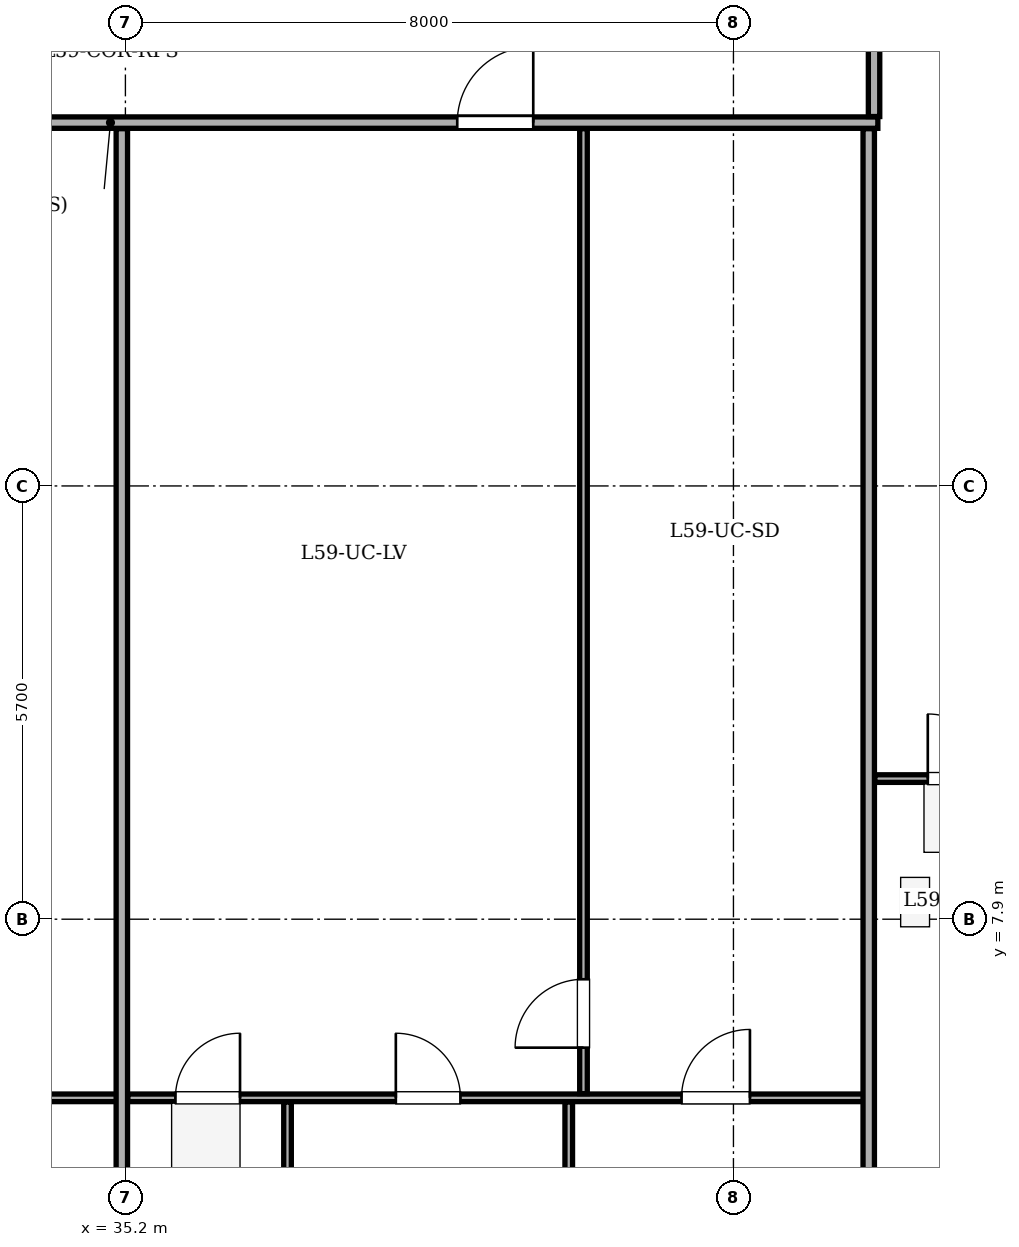
"""IFC4 building model, lengths in metres.
Left out: names, types, materials, properties, quantities, classifications, styles, units other than length and angle.
Written with IfcOpenShell. Run it as: python <this file> out.ifc"""

import sys

from ifc_helpers import new_model, si_unit, direction, frame, frame_2d, origin, place, context, subcontext, project, spatial, rectangle, extrude, element, fill, save


model = new_model("IFC4")
c1 = context("Model", 3, precision=1e-05, world=origin(), true_north=direction((0.0, 1.0)))
c2 = subcontext(c1, "Body", "Model", "MODEL_VIEW")
j1 = project(units=[si_unit("LENGTHUNIT", "METRE"), si_unit("PLANEANGLEUNIT", "RADIAN")], contexts=[c1])
p1 = place(None, origin())
s1 = spatial("IfcSite", under=j1, at=p1, CompositionType="ELEMENT")
p2 = place(p1, origin())
s2 = spatial("IfcBuilding", under=s1, at=p2, CompositionType="ELEMENT")
p3 = place(p2, frame((0.0, 0.0, 227.9)))
s3 = spatial("IfcBuildingStorey", under=s2, at=p3, CompositionType="ELEMENT", Elevation=227.9)
p4 = place(p3, frame((15.08, 18.38, 0.0), z_axis=(0.0, 0.0, 1.0), x_axis=(1.0, 0.0, 0.0)))
e1 = element("IfcWall", 1, at=p4, inside=s3, PredefinedType="PARTITIONING", context=c2, shape_type="SweptSolid", body=[
    extrude(rectangle(XDim=30.02, YDim=0.15, at=frame_2d((15.01, 0.0))), origin(), (0.0, 0.0, 1.0), 3.1),
])
p5 = place(p4, frame((4.385, 0.0, 0.0)))
e2 = element("IfcOpeningElement", 2, at=p5, cuts=e1, PredefinedType="OPENING", context=c2, shape_type="SweptSolid", body=[
    extrude(rectangle(XDim=1.0, YDim=2.1, at=frame_2d((0.5, 1.05))), frame((0.0, 0.085, 0.0), z_axis=(0.0, -1.0, 0.0), x_axis=(1.0, 0.0, 0.0)), (0.0, 0.0, 1.0), 0.17),
])
p6 = place(p4, frame((14.361, 0.0, 0.0)))
e3 = element("IfcOpeningElement", 3, at=p6, cuts=e1, PredefinedType="OPENING", context=c2, shape_type="SweptSolid", body=[
    extrude(rectangle(XDim=1.0, YDim=2.1, at=frame_2d((0.5, 1.05))), frame((0.0, 0.085, 0.0), z_axis=(0.0, -1.0, 0.0), x_axis=(1.0, 0.0, 0.0)), (0.0, 0.0, 1.0), 0.17),
])
p7 = place(p4, frame((24.486, 0.0, 0.0)))
e4 = element("IfcOpeningElement", 4, at=p7, cuts=e1, PredefinedType="OPENING", context=c2, shape_type="SweptSolid", body=[
    extrude(rectangle(XDim=1.0, YDim=2.1, at=frame_2d((0.5, 1.05))), frame((0.0, 0.085, 0.0), z_axis=(0.0, -1.0, 0.0), x_axis=(1.0, 0.0, 0.0)), (0.0, 0.0, 1.0), 0.17),
])
p8 = place(p3, frame((24.81, 5.55, 0.0), z_axis=(0.0, 0.0, 1.0), x_axis=(1.0, 0.0, 0.0)))
e5 = element("IfcWall", 5, at=p8, inside=s3, PredefinedType="PARTITIONING", context=c2, shape_type="SweptSolid", body=[
    extrude(rectangle(XDim=10.383, YDim=0.1, at=frame_2d((5.191, 0.0))), origin(), (0.0, 0.0, 1.0), 3.1),
])
p9 = place(p8, frame((0.625, 0.0, 0.0)))
e6 = element("IfcOpeningElement", 6, at=p9, cuts=e5, PredefinedType="OPENING", context=c2, shape_type="SweptSolid", body=[
    extrude(rectangle(XDim=0.85, YDim=2.05, at=frame_2d((0.425, 1.025))), frame((0.0, 0.06, 0.0), z_axis=(0.0, -1.0, 0.0), x_axis=(1.0, 0.0, 0.0)), (0.0, 0.0, 1.0), 0.12),
])
p10 = place(p8, frame((3.704, 0.0, 0.0)))
e7 = element("IfcOpeningElement", 7, at=p10, cuts=e5, PredefinedType="OPENING", context=c2, shape_type="SweptSolid", body=[
    extrude(rectangle(XDim=0.85, YDim=2.05, at=frame_2d((0.425, 1.025))), frame((0.0, 0.06, 0.0), z_axis=(0.0, -1.0, 0.0), x_axis=(1.0, 0.0, 0.0)), (0.0, 0.0, 1.0), 0.12),
])
p11 = place(p8, frame((7.761, 0.0, 0.0)))
e8 = element("IfcOpeningElement", 8, at=p11, cuts=e5, PredefinedType="OPENING", context=c2, shape_type="SweptSolid", body=[
    extrude(rectangle(XDim=0.9, YDim=2.05, at=frame_2d((0.45, 1.025))), frame((0.0, 0.06, 0.0), z_axis=(0.0, -1.0, 0.0), x_axis=(1.0, 0.0, 0.0)), (0.0, 0.0, 1.0), 0.12),
])
p12 = place(p3, frame((35.153, 3.045, 0.0), z_axis=(0.0, 0.0, 1.0), x_axis=(0.0, 1.0, 0.0)))
e9 = element("IfcWall", 9, at=p12, inside=s3, PredefinedType="PARTITIONING", context=c2, shape_type="SweptSolid", body=[
    extrude(rectangle(XDim=15.255, YDim=0.15, at=frame_2d((7.627, 0.0))), origin(), (0.0, 0.0, 1.0), 2.535),
])
p13 = place(p3, frame((35.233, 5.55, 0.0), z_axis=(0.0, 0.0, 1.0), x_axis=(1.0, 0.0, 0.0)))
e10 = element("IfcWall", 10, at=p13, inside=s3, PredefinedType="PARTITIONING", context=c2, shape_type="SweptSolid", body=[
    extrude(rectangle(XDim=9.787, YDim=0.1, at=frame_2d((4.894, 0.0))), origin(), (0.0, 0.0, 1.0), 3.1),
])
p14 = place(p13, frame((0.625, 0.0, 0.0)))
e11 = element("IfcOpeningElement", 11, at=p14, cuts=e10, PredefinedType="OPENING", context=c2, shape_type="SweptSolid", body=[
    extrude(rectangle(XDim=0.85, YDim=2.05, at=frame_2d((0.425, 1.025))), frame((0.0, 0.06, 0.0), z_axis=(0.0, -1.0, 0.0), x_axis=(1.0, 0.0, 0.0)), (0.0, 0.0, 1.0), 0.12),
])
p15 = place(p13, frame((3.525, 0.0, 0.0)))
e12 = element("IfcOpeningElement", 12, at=p15, cuts=e10, PredefinedType="OPENING", context=c2, shape_type="SweptSolid", body=[
    extrude(rectangle(XDim=0.85, YDim=2.05, at=frame_2d((0.425, 1.025))), frame((0.0, 0.06, 0.0), z_axis=(0.0, -1.0, 0.0), x_axis=(1.0, 0.0, 0.0)), (0.0, 0.0, 1.0), 0.12),
])
p16 = place(p13, frame((7.284, 0.0, 0.0)))
e13 = element("IfcOpeningElement", 13, at=p16, cuts=e10, PredefinedType="OPENING", context=c2, shape_type="SweptSolid", body=[
    extrude(rectangle(XDim=0.9, YDim=2.05, at=frame_2d((0.45, 1.025))), frame((0.0, 0.06, 0.0), z_axis=(0.0, -1.0, 0.0), x_axis=(1.0, 0.0, 0.0)), (0.0, 0.0, 1.0), 0.12),
])
p17 = place(p3, frame((41.227, 5.605, 0.0), z_axis=(0.0, 0.0, 1.0), x_axis=(0.0, 1.0, 0.0)))
e14 = element("IfcWall", 14, at=p17, inside=s3, PredefinedType="PARTITIONING", context=c2, shape_type="SweptSolid", body=[
    extrude(rectangle(XDim=12.695, YDim=0.1, at=frame_2d((6.348, 0.0))), origin(), (0.0, 0.0, 1.0), 3.1),
])
p18 = place(p17, frame((0.605, 0.0, 0.0)))
e15 = element("IfcOpeningElement", 15, at=p18, cuts=e14, PredefinedType="OPENING", context=c2, shape_type="SweptSolid", body=[
    extrude(rectangle(XDim=0.9, YDim=2.05, at=frame_2d((0.45, 1.025))), frame((0.0, 0.06, 0.0), z_axis=(0.0, -1.0, 0.0), x_axis=(1.0, 0.0, 0.0)), (0.0, 0.0, 1.0), 0.12),
])
for number, where, z_axis, x_axis in (
    (16, (37.333, 3.045, 0.0), (0.0, 0.0, 1.0), (0.0, 1.0, 0.0)),
    (17, (41.033, 3.045, 0.0), (0.0, 0.0, 1.0), (0.0, 1.0, 0.0)),
):
    element("IfcWall", number, at=place(p3, frame(where, z_axis=z_axis, x_axis=x_axis)), inside=s3, PredefinedType="PARTITIONING", context=c2, shape_type="SweptSolid", body=[
        extrude(rectangle(XDim=2.45, YDim=0.1, at=frame_2d((1.225, 0.0))), origin(), (0.0, 0.0, 1.0), 3.1),
    ])
p19 = place(p3, frame((44.98, 3.045, 0.0), z_axis=(0.0, 0.0, 1.0), x_axis=(0.0, 1.0, 0.0)))
e18 = element("IfcWall", 18, at=p19, inside=s3, PredefinedType="PARTITIONING", context=c2, shape_type="SweptSolid", body=[
    extrude(rectangle(XDim=15.255, YDim=0.15, at=frame_2d((7.627, 0.0))), origin(), (0.0, 0.0, 1.0), 2.725),
])
p20 = place(p3, frame((45.05, 18.46, 0.0), z_axis=(0.0, 0.0, 1.0), x_axis=(0.0, 1.0, 0.0)))
e19 = element("IfcWall", 19, at=p20, inside=s3, PredefinedType="PARTITIONING", context=c2, shape_type="SweptSolid", body=[
    extrude(rectangle(XDim=1.79, YDim=0.15, at=frame_2d((0.895, 0.0))), origin(), (0.0, 0.0, 1.0), 2.725),
])
p21 = place(p3, frame((45.06, 9.75, 0.0), z_axis=(0.0, 0.0, 1.0), x_axis=(1.0, 0.0, 0.0)))
e20 = element("IfcWall", 20, at=p21, inside=s3, PredefinedType="PARTITIONING", context=c2, shape_type="SweptSolid", body=[
    extrude(rectangle(XDim=10.295, YDim=0.1, at=frame_2d((5.147, 0.0))), origin(), (0.0, 0.0, 1.0), 3.1),
])
p22 = place(p21, frame((0.697, 0.0, 0.0)))
e21 = element("IfcOpeningElement", 21, at=p22, cuts=e20, PredefinedType="OPENING", context=c2, shape_type="SweptSolid", body=[
    extrude(rectangle(XDim=0.85, YDim=2.05, at=frame_2d((0.425, 1.025))), frame((0.0, 0.06, 0.0), z_axis=(0.0, -1.0, 0.0), x_axis=(1.0, 0.0, 0.0)), (0.0, 0.0, 1.0), 0.12),
])
p23 = place(p21, frame((3.068, 0.0, 0.0)))
e22 = element("IfcOpeningElement", 22, at=p23, cuts=e20, PredefinedType="OPENING", context=c2, shape_type="SweptSolid", body=[
    extrude(rectangle(XDim=0.85, YDim=2.05, at=frame_2d((0.425, 1.025))), frame((0.0, 0.06, 0.0), z_axis=(0.0, -1.0, 0.0), x_axis=(1.0, 0.0, 0.0)), (0.0, 0.0, 1.0), 0.12),
])
p24 = place(p21, frame((5.384, 0.0, 0.0)))
e23 = element("IfcOpeningElement", 23, at=p24, cuts=e20, PredefinedType="OPENING", context=c2, shape_type="SweptSolid", body=[
    extrude(rectangle(XDim=0.9, YDim=2.05, at=frame_2d((0.45, 1.025))), frame((0.0, 0.06, 0.0), z_axis=(0.0, -1.0, 0.0), x_axis=(1.0, 0.0, 0.0)), (0.0, 0.0, 1.0), 0.12),
])
p25 = place(p21, frame((8.208, 0.0, 0.0)))
e24 = element("IfcOpeningElement", 24, at=p25, cuts=e20, PredefinedType="OPENING", context=c2, shape_type="SweptSolid", body=[
    extrude(rectangle(XDim=0.9, YDim=2.05, at=frame_2d((0.45, 1.025))), frame((0.0, 0.06, 0.0), z_axis=(0.0, -1.0, 0.0), x_axis=(1.0, 0.0, 0.0)), (0.0, 0.0, 1.0), 0.12),
])
p26 = place(p7, origin())
e25 = element("IfcDoor", 25, at=p26, inside=s3, OperationType="SINGLE_SWING_RIGHT", PredefinedType="DOOR", context=c2, shape_type="SweptSolid", body=[
    extrude(rectangle(XDim=1.0, YDim=2.1, at=frame_2d((0.5, 1.05))), frame((0.0, 0.025, 0.0), z_axis=(0.0, -1.0, 0.0), x_axis=(1.0, 0.0, 0.0)), (0.0, 0.0, 1.0), 0.05),
])
fill(e4, e25)
p27 = place(p18, origin())
e26 = element("IfcDoor", 26, at=p27, inside=s3, OperationType="SINGLE_SWING_LEFT", PredefinedType="DOOR", context=c2, shape_type="SweptSolid", body=[
    extrude(rectangle(XDim=0.9, YDim=2.05, at=frame_2d((0.45, 1.025))), frame((0.0, 0.025, 0.0), z_axis=(0.0, -1.0, 0.0), x_axis=(1.0, 0.0, 0.0)), (0.0, 0.0, 1.0), 0.05),
])
fill(e15, e26)
p28 = place(p14, origin())
e27 = element("IfcDoor", 27, at=p28, inside=s3, OperationType="SINGLE_SWING_RIGHT", PredefinedType="DOOR", context=c2, shape_type="SweptSolid", body=[
    extrude(rectangle(XDim=0.85, YDim=2.05, at=frame_2d((0.425, 1.025))), frame((0.0, 0.025, 0.0), z_axis=(0.0, -1.0, 0.0), x_axis=(1.0, 0.0, 0.0)), (0.0, 0.0, 1.0), 0.05),
])
fill(e11, e27)
p29 = place(p15, origin())
e28 = element("IfcDoor", 28, at=p29, inside=s3, OperationType="SINGLE_SWING_LEFT", PredefinedType="DOOR", context=c2, shape_type="SweptSolid", body=[
    extrude(rectangle(XDim=0.85, YDim=2.05, at=frame_2d((0.425, 1.025))), frame((0.0, 0.025, 0.0), z_axis=(0.0, -1.0, 0.0), x_axis=(1.0, 0.0, 0.0)), (0.0, 0.0, 1.0), 0.05),
])
fill(e12, e28)
p30 = place(p16, origin())
e29 = element("IfcDoor", 29, at=p30, inside=s3, OperationType="SINGLE_SWING_RIGHT", PredefinedType="DOOR", context=c2, shape_type="SweptSolid", body=[
    extrude(rectangle(XDim=0.9, YDim=2.05, at=frame_2d((0.45, 1.025))), frame((0.0, 0.025, 0.0), z_axis=(0.0, -1.0, 0.0), x_axis=(1.0, 0.0, 0.0)), (0.0, 0.0, 1.0), 0.05),
])
fill(e13, e29)
p31 = place(p22, origin())
e30 = element("IfcDoor", 30, at=p31, inside=s3, OperationType="SINGLE_SWING_LEFT", PredefinedType="DOOR", context=c2, shape_type="SweptSolid", body=[
    extrude(rectangle(XDim=0.85, YDim=2.05, at=frame_2d((0.425, 1.025))), frame((0.0, 0.025, 0.0), z_axis=(0.0, -1.0, 0.0), x_axis=(1.0, 0.0, 0.0)), (0.0, 0.0, 1.0), 0.05),
])
fill(e21, e30)
save(model, sys.argv[1])
